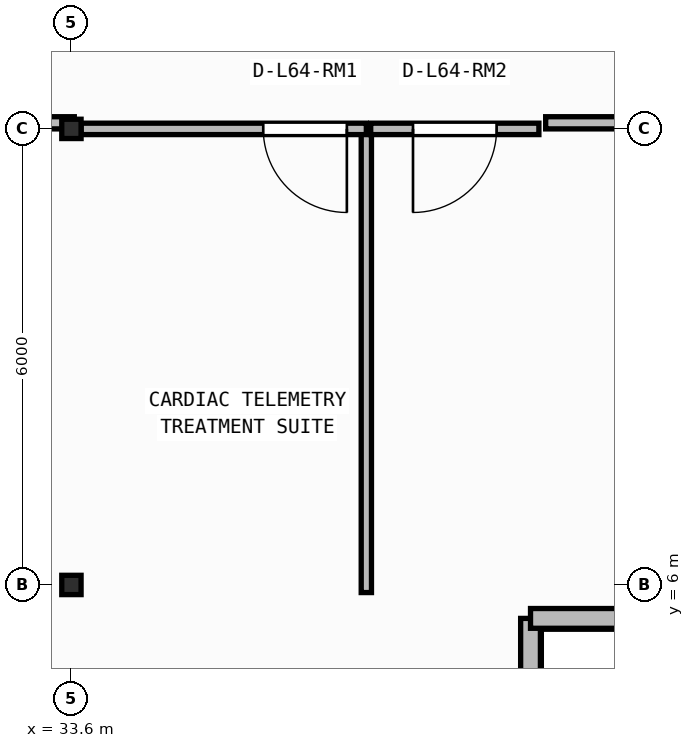
"""IFC4 building model, lengths in metres.
Left out: names, types, materials, properties, quantities, classifications, styles, units other than length and angle.
Written with IfcOpenShell. Run it as: python <this file> out.ifc"""

import sys

from ifc_helpers import new_model, si_unit, direction, frame, frame_2d, origin, origin_2d, place, context, subcontext, project, spatial, rectangle, i_section, extrude, element, fill, save


model = new_model("IFC4")
c1 = context("Model", 3, precision=1e-05, world=origin(), true_north=direction((0.0, 1.0)))
c2 = subcontext(c1, "Body", "Model", "MODEL_VIEW")
j1 = project(units=[si_unit("LENGTHUNIT", "METRE"), si_unit("PLANEANGLEUNIT", "RADIAN")], contexts=[c1])
p1 = place(None, origin())
s1 = spatial("IfcSite", under=j1, at=p1, CompositionType="ELEMENT")
p2 = place(p1, origin())
s2 = spatial("IfcBuilding", under=s1, at=p2, CompositionType="ELEMENT")
p3 = place(p2, frame((0.0, 0.0, 260.5)))
s3 = spatial("IfcBuildingStorey", under=s2, at=p3, CompositionType="ELEMENT", Elevation=260.5)
for number, where, z_axis, x_axis in (
    (1, (33.6, 6.0, 0.0), (0.0, 0.0, 1.0), (1.0, 0.0, 0.0)),
    (2, (33.6, 12.0, 0.0), (0.0, 0.0, 1.0), (1.0, 0.0, 0.0)),
):
    element("IfcColumn", number, at=place(p3, frame(where, z_axis=z_axis, x_axis=x_axis)), inside=s3, PredefinedType="COLUMN", context=c2, shape_type="SweptSolid", body=[
        extrude(i_section(OverallWidth=0.254, OverallDepth=0.254, WebThickness=0.009, FlangeThickness=0.014, FilletRadius=0.013, at=origin_2d()), origin(), (0.0, 0.0, 1.0), 3.95),
    ])
p4 = place(p3, frame((39.64, 3.148, 0.0), z_axis=(0.0, 0.0, 1.0), x_axis=(0.0, 1.0, 0.0)))
e3 = element("IfcWall", 3, at=p4, inside=s3, PredefinedType="STANDARD", context=c2, shape_type="SweptSolid", body=[
    extrude(rectangle(XDim=2.412, YDim=0.26, at=frame_2d((1.206, 0.0))), origin(), (0.0, 0.0, 1.0), 3.71),
])
p5 = place(p3, frame((39.64, 5.56, 0.0), z_axis=(0.0, 0.0, 1.0), x_axis=(1.0, 0.0, 0.0)))
e4 = element("IfcWall", 4, at=p5, inside=s3, PredefinedType="STANDARD", context=c2, shape_type="SweptSolid", body=[
    extrude(rectangle(XDim=2.4, YDim=0.26, at=frame_2d((1.2, 0.0))), origin(), (0.0, 0.0, 1.0), 3.71),
])
p6 = place(p3, frame((37.48, 5.9, 0.0), z_axis=(0.0, 0.0, 1.0), x_axis=(0.0, 1.0, 0.0)))
e5 = element("IfcWall", 5, at=p6, inside=s3, PredefinedType="PARTITIONING", context=c2, shape_type="SweptSolid", body=[
    extrude(rectangle(XDim=6.1, YDim=0.135, at=frame_2d((3.05, 0.0))), origin(), (0.0, 0.0, 1.0), 3.71),
])
p7 = place(p3, frame((37.48, 12.0, 0.0), z_axis=(0.0, 0.0, 1.0), x_axis=(-1.0, 0.0, 0.0)))
e6 = element("IfcWall", 6, at=p7, inside=s3, PredefinedType="PARTITIONING", context=c2, shape_type="SweptSolid", body=[
    extrude(rectangle(XDim=3.753, YDim=0.15, at=frame_2d((1.876, 0.0))), origin(), (0.0, 0.0, 1.0), 3.71),
])
p8 = place(p7, frame((0.256, 0.0, 0.0)))
e7 = element("IfcOpeningElement", 7, at=p8, cuts=e6, PredefinedType="OPENING", context=c2, shape_type="SweptSolid", body=[
    extrude(rectangle(XDim=1.1, YDim=2.1, at=frame_2d((0.55, 1.05))), frame((0.0, 0.085, 0.0), z_axis=(0.0, -1.0, 0.0), x_axis=(1.0, 0.0, 0.0)), (0.0, 0.0, 1.0), 0.17),
])
p9 = place(p3, frame((39.75, 12.0, 0.0), z_axis=(0.0, 0.0, 1.0), x_axis=(-1.0, 0.0, 0.0)))
e8 = element("IfcWall", 8, at=p9, inside=s3, PredefinedType="PARTITIONING", context=c2, shape_type="SweptSolid", body=[
    extrude(rectangle(XDim=2.212, YDim=0.15, at=frame_2d((1.106, 0.0))), origin(), (0.0, 0.0, 1.0), 3.71),
])
p10 = place(p9, frame((0.556, 0.0, 0.0)))
e9 = element("IfcOpeningElement", 9, at=p10, cuts=e8, PredefinedType="OPENING", context=c2, shape_type="SweptSolid", body=[
    extrude(rectangle(XDim=1.1, YDim=2.1, at=frame_2d((0.55, 1.05))), frame((0.0, 0.085, 0.0), z_axis=(0.0, -1.0, 0.0), x_axis=(1.0, 0.0, 0.0)), (0.0, 0.0, 1.0), 0.17),
])
p11 = place(p3, frame((31.439, 12.08, 0.0), z_axis=(0.0, 0.0, 1.0), x_axis=(1.0, 0.0, 0.0)))
e10 = element("IfcWall", 10, at=p11, inside=s3, PredefinedType="PARTITIONING", context=c2, shape_type="SweptSolid", body=[
    extrude(rectangle(XDim=2.198, YDim=0.16, at=frame_2d((1.099, 0.0))), origin(), (0.0, 0.0, 1.0), 3.157),
])
p12 = place(p3, frame((39.839, 12.08, 0.0), z_axis=(0.0, 0.0, 1.0), x_axis=(1.0, 0.0, 0.0)))
e11 = element("IfcWall", 11, at=p12, inside=s3, PredefinedType="PARTITIONING", context=c2, shape_type="SweptSolid", body=[
    extrude(rectangle(XDim=2.061, YDim=0.16, at=frame_2d((1.03, 0.0))), origin(), (0.0, 0.0, 1.0), 3.71),
])
p13 = place(p8, origin())
e12 = element("IfcDoor", 12, at=p13, inside=s3, OperationType="SINGLE_SWING_LEFT", PredefinedType="DOOR", context=c2, shape_type="SweptSolid", body=[
    extrude(rectangle(XDim=1.1, YDim=2.1, at=frame_2d((0.55, 1.05))), frame((0.0, 0.025, 0.0), z_axis=(0.0, -1.0, 0.0), x_axis=(1.0, 0.0, 0.0)), (0.0, 0.0, 1.0), 0.05),
])
fill(e7, e12)
p14 = place(p10, origin())
e13 = element("IfcDoor", 13, at=p14, inside=s3, OperationType="SINGLE_SWING_RIGHT", PredefinedType="DOOR", context=c2, shape_type="SweptSolid", body=[
    extrude(rectangle(XDim=1.1, YDim=2.1, at=frame_2d((0.55, 1.05))), frame((0.0, 0.025, 0.0), z_axis=(0.0, -1.0, 0.0), x_axis=(1.0, 0.0, 0.0)), (0.0, 0.0, 1.0), 0.05),
])
fill(e9, e13)
save(model, sys.argv[1])
